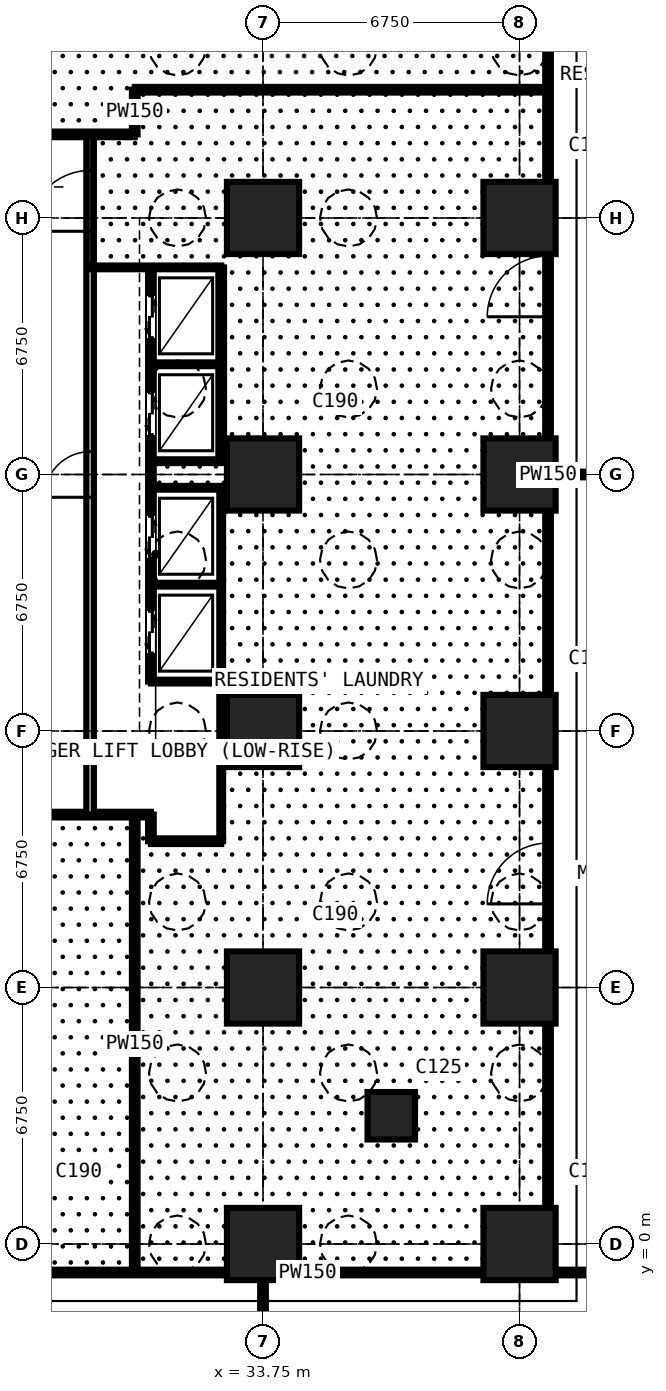
"""IFC4 building model, lengths in metres.
Left out: names, types, materials, properties, quantities, classifications, styles, units other than length and angle.
Written with IfcOpenShell. Run it as: python <this file> out.ifc"""

import sys

from ifc_helpers import new_model, si_unit, direction, frame, frame_2d, origin, origin_2d, place, context, subcontext, project, spatial, rectangle, extrude, element, fill, save


model = new_model("IFC4")
c1 = context("Model", 3, precision=1e-05, world=origin(), true_north=direction((0.0, 1.0)))
c2 = subcontext(c1, "Body", "Model", "MODEL_VIEW")
j1 = project(units=[si_unit("LENGTHUNIT", "METRE"), si_unit("PLANEANGLEUNIT", "RADIAN")], contexts=[c1])
p1 = place(None, origin())
s1 = spatial("IfcSite", under=j1, at=p1, CompositionType="ELEMENT")
p2 = place(p1, origin())
s2 = spatial("IfcBuilding", under=s1, at=p2, CompositionType="ELEMENT")
p3 = place(p2, origin())
s3 = spatial("IfcBuildingStorey", under=s2, at=p3, CompositionType="ELEMENT", Elevation=0.0)
for number, where, z_axis, x_axis in (
    (1, (33.75, 0.0, 0.0), (0.0, 0.0, 1.0), (1.0, 0.0, 0.0)),
    (2, (33.75, 6.75, 0.0), (0.0, 0.0, 1.0), (1.0, 0.0, 0.0)),
    (3, (33.75, 13.5, 0.0), (0.0, 0.0, 1.0), (1.0, 0.0, 0.0)),
    (4, (33.75, 20.25, 0.0), (0.0, 0.0, 1.0), (1.0, 0.0, 0.0)),
    (5, (33.75, 27.0, 0.0), (0.0, 0.0, 1.0), (1.0, 0.0, 0.0)),
):
    element("IfcColumn", number, at=place(p3, frame(where, z_axis=z_axis, x_axis=x_axis)), inside=s3, PredefinedType="COLUMN", context=c2, shape_type="SweptSolid", body=[
        extrude(rectangle(XDim=1.9, YDim=1.9, at=origin_2d()), origin(), (0.0, 0.0, 1.0), 4.5),
    ])
p4 = place(p3, frame((37.125, 3.375, 0.0), z_axis=(0.0, 0.0, 1.0), x_axis=(1.0, 0.0, 0.0)))
e6 = element("IfcColumn", 6, at=p4, inside=s3, PredefinedType="COLUMN", context=c2, shape_type="SweptSolid", body=[
    extrude(rectangle(XDim=1.25, YDim=1.25, at=origin_2d()), origin(), (0.0, 0.0, 1.0), 4.5),
])
for number, where, z_axis, x_axis in (
    (7, (40.5, 0.0, 0.0), (0.0, 0.0, 1.0), (1.0, 0.0, 0.0)),
    (8, (40.5, 6.75, 0.0), (0.0, 0.0, 1.0), (1.0, 0.0, 0.0)),
    (9, (40.5, 13.5, 0.0), (0.0, 0.0, 1.0), (1.0, 0.0, 0.0)),
    (10, (40.5, 20.25, 0.0), (0.0, 0.0, 1.0), (1.0, 0.0, 0.0)),
    (11, (40.5, 27.0, 0.0), (0.0, 0.0, 1.0), (1.0, 0.0, 0.0)),
):
    element("IfcColumn", number, at=place(p3, frame(where, z_axis=z_axis, x_axis=x_axis)), inside=s3, PredefinedType="COLUMN", context=c2, shape_type="SweptSolid", body=[
        extrude(rectangle(XDim=1.9, YDim=1.9, at=origin_2d()), origin(), (0.0, 0.0, 1.0), 4.5),
    ])
p5 = place(p3, frame((8.9, 29.2, 0.0), z_axis=(0.0, 0.0, 1.0), x_axis=(1.0, 0.0, 0.0)))
e12 = element("IfcWall", 12, at=p5, inside=s3, PredefinedType="PARTITIONING", context=c2, shape_type="SweptSolid", body=[
    extrude(rectangle(XDim=21.475, YDim=0.15, at=frame_2d((10.738, 0.0))), origin(), (0.0, 0.0, 1.0), 4.25),
])
p6 = place(p5, frame((10.55, 0.0, 0.0)))
e13 = element("IfcOpeningElement", 13, at=p6, cuts=e12, PredefinedType="OPENING", context=c2, shape_type="SweptSolid", body=[
    extrude(rectangle(XDim=1.6, YDim=2.4, at=frame_2d((0.8, 1.2))), frame((0.0, 0.085, 0.0), z_axis=(0.0, -1.0, 0.0), x_axis=(1.0, 0.0, 0.0)), (0.0, 0.0, 1.0), 0.17),
])
p7 = place(p3, frame((10.125, 11.3, 0.0), z_axis=(0.0, 0.0, 1.0), x_axis=(1.0, 0.0, 0.0)))
e14 = element("IfcWall", 14, at=p7, inside=s3, PredefinedType="PARTITIONING", context=c2, shape_type="SweptSolid", body=[
    extrude(rectangle(XDim=20.675, YDim=0.15, at=frame_2d((10.337, 0.0))), origin(), (0.0, 0.0, 1.0), 4.25),
])
p8 = place(p7, frame((9.325, 0.0, 0.0)))
e15 = element("IfcOpeningElement", 15, at=p8, cuts=e14, PredefinedType="OPENING", context=c2, shape_type="SweptSolid", body=[
    extrude(rectangle(XDim=1.6, YDim=2.4, at=frame_2d((0.8, 1.2))), frame((0.0, 0.085, 0.0), z_axis=(0.0, -1.0, 0.0), x_axis=(1.0, 0.0, 0.0)), (0.0, 0.0, 1.0), 0.17),
])
p9 = place(p3, frame((27.0, -0.75, 0.0), z_axis=(0.0, 0.0, 1.0), x_axis=(1.0, 0.0, 0.0)))
e16 = element("IfcWall", 16, at=p9, inside=s3, PredefinedType="PARTITIONING", context=c2, shape_type="SweptSolid", body=[
    extrude(rectangle(XDim=15.85, YDim=0.15, at=frame_2d((7.925, 0.0))), origin(), (0.0, 0.0, 1.0), 4.25),
])
p10 = place(p3, frame((29.2, 11.3, 0.0), z_axis=(0.0, 0.0, 1.0), x_axis=(0.0, 1.0, 0.0)))
e17 = element("IfcWall", 17, at=p10, inside=s3, PredefinedType="PARTITIONING", context=c2, shape_type="SweptSolid", body=[
    extrude(rectangle(XDim=17.9, YDim=0.2, at=frame_2d((8.95, 0.0))), origin(), (0.0, 0.0, 1.0), 4.25),
])
p11 = place(p10, frame((15.35, 0.0, 0.0)))
e18 = element("IfcOpeningElement", 18, at=p11, cuts=e17, PredefinedType="OPENING", context=c2, shape_type="SweptSolid", body=[
    extrude(rectangle(XDim=1.6, YDim=2.4, at=frame_2d((0.8, 1.2))), frame((0.0, 0.11, 0.0), z_axis=(0.0, -1.0, 0.0), x_axis=(1.0, 0.0, 0.0)), (0.0, 0.0, 1.0), 0.22),
])
p12 = place(p10, frame((8.35, 0.0, 0.0)))
e19 = element("IfcOpeningElement", 19, at=p12, cuts=e17, PredefinedType="OPENING", context=c2, shape_type="SweptSolid", body=[
    extrude(rectangle(XDim=1.2, YDim=2.2, at=frame_2d((0.6, 1.1))), frame((0.0, 0.11, 0.0), z_axis=(0.0, -1.0, 0.0), x_axis=(1.0, 0.0, 0.0)), (0.0, 0.0, 1.0), 0.22),
])
p13 = place(p3, frame((29.2, 25.7, 0.0), z_axis=(0.0, 0.0, 1.0), x_axis=(1.0, 0.0, 0.0)))
e20 = element("IfcWall", 20, at=p13, inside=s3, PredefinedType="SHEAR", context=c2, shape_type="SweptSolid", body=[
    extrude(rectangle(XDim=3.45, YDim=0.1, at=frame_2d((1.725, 0.0))), origin(), (0.0, 0.0, 1.0), 4.25),
])
p14 = place(p3, frame((30.375, -0.75, 0.0), z_axis=(0.0, 0.0, 1.0), x_axis=(0.0, 1.0, 0.0)))
e21 = element("IfcWall", 21, at=p14, inside=s3, PredefinedType="PARTITIONING", context=c2, shape_type="SweptSolid", body=[
    extrude(rectangle(XDim=12.05, YDim=0.15, at=frame_2d((6.025, 0.0))), origin(), (0.0, 0.0, 1.0), 4.25),
])
p15 = place(p3, frame((30.375, 29.2, 0.0), z_axis=(0.0, 0.0, 1.0), x_axis=(0.0, 1.0, 0.0)))
e22 = element("IfcWall", 22, at=p15, inside=s3, PredefinedType="PARTITIONING", context=c2, shape_type="SweptSolid", body=[
    extrude(rectangle(XDim=1.175, YDim=0.15, at=frame_2d((0.587, 0.0))), origin(), (0.0, 0.0, 1.0), 4.25),
])
p16 = place(p3, frame((30.375, 30.375, 0.0), z_axis=(0.0, 0.0, 1.0), x_axis=(1.0, 0.0, 0.0)))
e23 = element("IfcWall", 23, at=p16, inside=s3, PredefinedType="PARTITIONING", context=c2, shape_type="SweptSolid", body=[
    extrude(rectangle(XDim=10.875, YDim=0.15, at=frame_2d((5.438, 0.0))), origin(), (0.0, 0.0, 1.0), 4.25),
])
p17 = place(p3, frame((30.8, 10.6, 0.0), z_axis=(0.0, 0.0, 1.0), x_axis=(0.0, 1.0, 0.0)))
e24 = element("IfcWall", 24, at=p17, inside=s3, PredefinedType="PARTITIONING", context=c2, shape_type="SweptSolid", body=[
    extrude(rectangle(XDim=0.7, YDim=0.15, at=frame_2d((0.35, 0.0))), origin(), (0.0, 0.0, 1.0), 4.25),
])
p18 = place(p3, frame((30.8, 10.6, 0.0), z_axis=(0.0, 0.0, 1.0), x_axis=(1.0, 0.0, 0.0)))
e25 = element("IfcWall", 25, at=p18, inside=s3, PredefinedType="PARTITIONING", context=c2, shape_type="SweptSolid", body=[
    extrude(rectangle(XDim=1.85, YDim=0.15, at=frame_2d((0.925, 0.0))), origin(), (0.0, 0.0, 1.0), 4.25),
])
p19 = place(p3, frame((30.8, 14.8, 0.0), z_axis=(0.0, 0.0, 1.0), x_axis=(0.0, 1.0, 0.0)))
e26 = element("IfcWall", 26, at=p19, inside=s3, PredefinedType="PARTITIONING", context=c2, shape_type="SweptSolid", body=[
    extrude(rectangle(XDim=10.9, YDim=0.15, at=frame_2d((5.45, 0.0))), origin(), (0.0, 0.0, 1.0), 4.25),
])
p20 = place(p19, frame((0.75, 0.0, 0.0)))
e27 = element("IfcOpeningElement", 27, at=p20, cuts=e26, PredefinedType="OPENING", context=c2, shape_type="SweptSolid", body=[
    extrude(rectangle(XDim=1.1, YDim=2.2, at=frame_2d((0.55, 1.1))), frame((0.0, 0.085, 0.0), z_axis=(0.0, -1.0, 0.0), x_axis=(1.0, 0.0, 0.0)), (0.0, 0.0, 1.0), 0.17),
])
p21 = place(p19, frame((3.25, 0.0, 0.0)))
e28 = element("IfcOpeningElement", 28, at=p21, cuts=e26, PredefinedType="OPENING", context=c2, shape_type="SweptSolid", body=[
    extrude(rectangle(XDim=1.1, YDim=2.2, at=frame_2d((0.55, 1.1))), frame((0.0, 0.085, 0.0), z_axis=(0.0, -1.0, 0.0), x_axis=(1.0, 0.0, 0.0)), (0.0, 0.0, 1.0), 0.17),
])
p22 = place(p19, frame((6.5, 0.0, 0.0)))
e29 = element("IfcOpeningElement", 29, at=p22, cuts=e26, PredefinedType="OPENING", context=c2, shape_type="SweptSolid", body=[
    extrude(rectangle(XDim=1.1, YDim=2.2, at=frame_2d((0.55, 1.1))), frame((0.0, 0.085, 0.0), z_axis=(0.0, -1.0, 0.0), x_axis=(1.0, 0.0, 0.0)), (0.0, 0.0, 1.0), 0.17),
])
p23 = place(p19, frame((9.05, 0.0, 0.0)))
e30 = element("IfcOpeningElement", 30, at=p23, cuts=e26, PredefinedType="OPENING", context=c2, shape_type="SweptSolid", body=[
    extrude(rectangle(XDim=1.1, YDim=2.2, at=frame_2d((0.55, 1.1))), frame((0.0, 0.085, 0.0), z_axis=(0.0, -1.0, 0.0), x_axis=(1.0, 0.0, 0.0)), (0.0, 0.0, 1.0), 0.17),
])
for number, where, z_axis, x_axis in (
    (31, (30.8, 14.8, 0.0), (0.0, 0.0, 1.0), (1.0, 0.0, 0.0)),
    (32, (30.8, 17.35, 0.0), (0.0, 0.0, 1.0), (1.0, 0.0, 0.0)),
    (33, (30.8, 19.9, 0.0), (0.0, 0.0, 1.0), (1.0, 0.0, 0.0)),
    (34, (30.8, 20.6, 0.0), (0.0, 0.0, 1.0), (1.0, 0.0, 0.0)),
    (35, (30.8, 23.15, 0.0), (0.0, 0.0, 1.0), (1.0, 0.0, 0.0)),
):
    element("IfcWall", number, at=place(p3, frame(where, z_axis=z_axis, x_axis=x_axis)), inside=s3, PredefinedType="SHEAR", context=c2, shape_type="SweptSolid", body=[
        extrude(rectangle(XDim=1.85, YDim=0.1, at=frame_2d((0.925, 0.0))), origin(), (0.0, 0.0, 1.0), 4.25),
    ])
p24 = place(p3, frame((32.65, 10.6, 0.0), z_axis=(0.0, 0.0, 1.0), x_axis=(0.0, 1.0, 0.0)))
e36 = element("IfcWall", 36, at=p24, inside=s3, PredefinedType="SHEAR", context=c2, shape_type="SweptSolid", body=[
    extrude(rectangle(XDim=9.3, YDim=0.1, at=frame_2d((4.65, 0.0))), origin(), (0.0, 0.0, 1.0), 4.25),
])
p25 = place(p3, frame((32.65, 20.6, 0.0), z_axis=(0.0, 0.0, 1.0), x_axis=(0.0, 1.0, 0.0)))
e37 = element("IfcWall", 37, at=p25, inside=s3, PredefinedType="PARTITIONING", context=c2, shape_type="SweptSolid", body=[
    extrude(rectangle(XDim=5.1, YDim=0.15, at=frame_2d((2.55, 0.0))), origin(), (0.0, 0.0, 1.0), 4.25),
])
p26 = place(p3, frame((33.75, -7.6, 0.0), z_axis=(0.0, 0.0, 1.0), x_axis=(0.0, 1.0, 0.0)))
e38 = element("IfcWall", 38, at=p26, inside=s3, PredefinedType="PARTITIONING", context=c2, shape_type="SweptSolid", body=[
    extrude(rectangle(XDim=6.85, YDim=0.15, at=frame_2d((3.425, 0.0))), origin(), (0.0, 0.0, 1.0), 3.752),
])
p27 = place(p3, frame((41.25, -0.75, 0.0), z_axis=(0.0, 0.0, 1.0), x_axis=(0.0, 1.0, 0.0)))
e39 = element("IfcWall", 39, at=p27, inside=s3, PredefinedType="PARTITIONING", context=c2, shape_type="SweptSolid", body=[
    extrude(rectangle(XDim=41.984, YDim=0.15, at=frame_2d((20.992, 0.0))), origin(), (0.0, 0.0, 1.0), 4.25),
])
p28 = place(p27, frame((9.7, 0.0, 0.0)))
e40 = element("IfcOpeningElement", 40, at=p28, cuts=e39, PredefinedType="OPENING", context=c2, shape_type="SweptSolid", body=[
    extrude(rectangle(XDim=1.6, YDim=2.4, at=frame_2d((0.8, 1.2))), frame((0.0, 0.085, 0.0), z_axis=(0.0, -1.0, 0.0), x_axis=(1.0, 0.0, 0.0)), (0.0, 0.0, 1.0), 0.17),
])
p29 = place(p27, frame((25.15, 0.0, 0.0)))
e41 = element("IfcOpeningElement", 41, at=p29, cuts=e39, PredefinedType="OPENING", context=c2, shape_type="SweptSolid", body=[
    extrude(rectangle(XDim=1.6, YDim=2.4, at=frame_2d((0.8, 1.2))), frame((0.0, 0.085, 0.0), z_axis=(0.0, -1.0, 0.0), x_axis=(1.0, 0.0, 0.0)), (0.0, 0.0, 1.0), 0.17),
])
p30 = place(p3, frame((41.25, 20.25, 0.0), z_axis=(0.0, 0.0, 1.0), x_axis=(1.0, 0.0, 0.0)))
e42 = element("IfcWall", 42, at=p30, inside=s3, PredefinedType="PARTITIONING", context=c2, shape_type="SweptSolid", body=[
    extrude(rectangle(XDim=6.734, YDim=0.15, at=frame_2d((3.367, 0.0))), origin(), (0.0, 0.0, 1.0), 3.752),
])
p31 = place(p11, origin())
e43 = element("IfcDoor", 43, at=p31, inside=s3, OperationType="DOUBLE_DOOR_SINGLE_SWING", PredefinedType="DOOR", context=c2, shape_type="SweptSolid", body=[
    extrude(rectangle(XDim=1.6, YDim=2.4, at=frame_2d((0.8, 1.2))), frame((0.0, 0.025, 0.0), z_axis=(0.0, -1.0, 0.0), x_axis=(1.0, 0.0, 0.0)), (0.0, 0.0, 1.0), 0.05),
])
fill(e18, e43)
p32 = place(p28, origin())
e44 = element("IfcDoor", 44, at=p32, inside=s3, OperationType="DOUBLE_DOOR_SINGLE_SWING", PredefinedType="DOOR", context=c2, shape_type="SweptSolid", body=[
    extrude(rectangle(XDim=1.6, YDim=2.4, at=frame_2d((0.8, 1.2))), frame((0.0, 0.025, 0.0), z_axis=(0.0, -1.0, 0.0), x_axis=(1.0, 0.0, 0.0)), (0.0, 0.0, 1.0), 0.05),
])
fill(e40, e44)
p33 = place(p29, origin())
e45 = element("IfcDoor", 45, at=p33, inside=s3, OperationType="DOUBLE_DOOR_SINGLE_SWING", PredefinedType="DOOR", context=c2, shape_type="SweptSolid", body=[
    extrude(rectangle(XDim=1.6, YDim=2.4, at=frame_2d((0.8, 1.2))), frame((0.0, 0.025, 0.0), z_axis=(0.0, -1.0, 0.0), x_axis=(1.0, 0.0, 0.0)), (0.0, 0.0, 1.0), 0.05),
])
fill(e41, e45)
p34 = place(p20, origin())
e46 = element("IfcDoor", 46, at=p34, inside=s3, OperationType="DOUBLE_DOOR_SLIDING", PredefinedType="DOOR", context=c2, shape_type="SweptSolid", body=[
    extrude(rectangle(XDim=1.1, YDim=2.2, at=frame_2d((0.55, 1.1))), frame((0.0, 0.025, 0.0), z_axis=(0.0, -1.0, 0.0), x_axis=(1.0, 0.0, 0.0)), (0.0, 0.0, 1.0), 0.05),
])
fill(e27, e46)
p35 = place(p21, origin())
e47 = element("IfcDoor", 47, at=p35, inside=s3, OperationType="DOUBLE_DOOR_SLIDING", PredefinedType="DOOR", context=c2, shape_type="SweptSolid", body=[
    extrude(rectangle(XDim=1.1, YDim=2.2, at=frame_2d((0.55, 1.1))), frame((0.0, 0.025, 0.0), z_axis=(0.0, -1.0, 0.0), x_axis=(1.0, 0.0, 0.0)), (0.0, 0.0, 1.0), 0.05),
])
fill(e28, e47)
p36 = place(p22, origin())
e48 = element("IfcDoor", 48, at=p36, inside=s3, OperationType="DOUBLE_DOOR_SLIDING", PredefinedType="DOOR", context=c2, shape_type="SweptSolid", body=[
    extrude(rectangle(XDim=1.1, YDim=2.2, at=frame_2d((0.55, 1.1))), frame((0.0, 0.025, 0.0), z_axis=(0.0, -1.0, 0.0), x_axis=(1.0, 0.0, 0.0)), (0.0, 0.0, 1.0), 0.05),
])
fill(e29, e48)
p37 = place(p23, origin())
e49 = element("IfcDoor", 49, at=p37, inside=s3, OperationType="DOUBLE_DOOR_SLIDING", PredefinedType="DOOR", context=c2, shape_type="SweptSolid", body=[
    extrude(rectangle(XDim=1.1, YDim=2.2, at=frame_2d((0.55, 1.1))), frame((0.0, 0.025, 0.0), z_axis=(0.0, -1.0, 0.0), x_axis=(1.0, 0.0, 0.0)), (0.0, 0.0, 1.0), 0.05),
])
fill(e30, e49)
p38 = place(p12, origin())
e50 = element("IfcDoor", 50, at=p38, inside=s3, OperationType="DOUBLE_DOOR_SINGLE_SWING", PredefinedType="DOOR", context=c2, shape_type="SweptSolid", body=[
    extrude(rectangle(XDim=1.2, YDim=2.2, at=frame_2d((0.6, 1.1))), frame((0.0, 0.025, 0.0), z_axis=(0.0, -1.0, 0.0), x_axis=(1.0, 0.0, 0.0)), (0.0, 0.0, 1.0), 0.05),
])
fill(e19, e50)
save(model, sys.argv[1])
